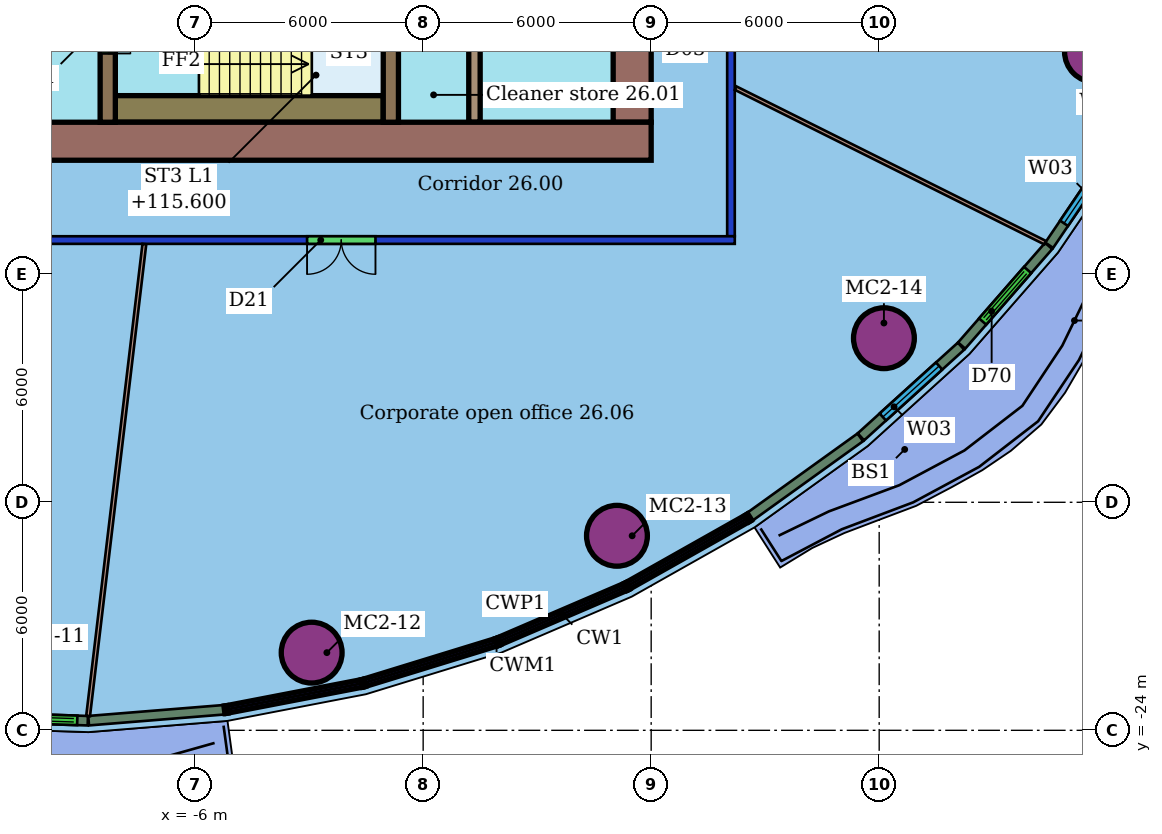
"""IFC4 building model, lengths in metres.
Left out: names, types, materials, properties, quantities, classifications, styles, units other than length and angle.
Written with IfcOpenShell. Run it as: python <this file> out.ifc"""

import sys

from ifc_helpers import new_model, si_unit, direction, frame, frame_2d, origin, origin_2d, place, context, subcontext, project, spatial, rectangle, hollow_circle, extrude, element, fill, save


model = new_model("IFC4")
c1 = context("Model", 3, precision=1e-05, world=origin(), true_north=direction((0.0, 1.0)))
c2 = subcontext(c1, "Body", "Model", "MODEL_VIEW")
j1 = project(units=[si_unit("LENGTHUNIT", "METRE"), si_unit("PLANEANGLEUNIT", "RADIAN")], contexts=[c1])
p1 = place(None, origin())
s1 = spatial("IfcSite", under=j1, at=p1, CompositionType="ELEMENT")
p2 = place(p1, origin())
s2 = spatial("IfcBuilding", under=s1, at=p2, CompositionType="ELEMENT")
p3 = place(p2, frame((0.0, 0.0, 113.8)))
s3 = spatial("IfcBuildingStorey", under=s2, at=p3, CompositionType="ELEMENT", Elevation=113.8)
for number, where, z_axis, x_axis in (
    (1, (-2.934, -21.956, 0.0), (0.0, 0.0, 1.0), (1.0, 0.0, 0.0)),
    (2, (5.1, -18.881, 0.0), (0.0, 0.0, 1.0), (1.0, 0.0, 0.0)),
    (3, (12.125, -13.683, 0.0), (0.0, 0.0, 1.0), (1.0, 0.0, 0.0)),
    (4, (17.679, -6.146, 0.0), (0.0, 0.0, 1.0), (1.0, 0.0, 0.0)),
):
    element("IfcColumn", number, at=place(p3, frame(where, z_axis=z_axis, x_axis=x_axis)), inside=s3, PredefinedType="COLUMN", context=c2, shape_type="SweptSolid", body=[
        extrude(hollow_circle(Radius=0.8, WallThickness=0.055, at=origin_2d()), origin(), (0.0, 0.0, 1.0), 3.45),
    ])
p4 = place(p3, frame((8.2, -11.1, 0.0), z_axis=(0.0, 0.0, 1.0), x_axis=(-1.0, 0.0, 0.0)))
e5 = element("IfcWall", 5, at=p4, inside=s3, PredefinedType="PARTITIONING", context=c2, shape_type="SweptSolid", body=[
    extrude(rectangle(XDim=28.4, YDim=0.2, at=frame_2d((14.2, 0.0))), origin(), (0.0, 0.0, 1.0), 3.0),
])
p5 = place(p4, frame((19.015, 0.0, 0.0)))
e6 = element("IfcOpeningElement", 6, at=p5, cuts=e5, PredefinedType="OPENING", context=c2, shape_type="SweptSolid", body=[
    extrude(rectangle(XDim=1.8, YDim=2.1, at=frame_2d((0.9, 1.05))), frame((0.0, 0.11, 0.0), z_axis=(0.0, -1.0, 0.0), x_axis=(1.0, 0.0, 0.0)), (0.0, 0.0, 1.0), 0.22),
])
p6 = place(p4, frame((9.455, 0.0, 0.0)))
e7 = element("IfcOpeningElement", 7, at=p6, cuts=e5, PredefinedType="OPENING", context=c2, shape_type="SweptSolid", body=[
    extrude(rectangle(XDim=1.8, YDim=2.1, at=frame_2d((0.9, 1.05))), frame((0.0, 0.11, 0.0), z_axis=(0.0, -1.0, 0.0), x_axis=(1.0, 0.0, 0.0)), (0.0, 0.0, 1.0), 0.22),
])
p7 = place(p3, frame((8.1, 11.0, 0.0), z_axis=(0.0, 0.0, 1.0), x_axis=(0.0, -1.0, 0.0)))
e8 = element("IfcWall", 8, at=p7, inside=s3, PredefinedType="PARTITIONING", context=c2, shape_type="SweptSolid", body=[
    extrude(rectangle(XDim=22.0, YDim=0.2, at=frame_2d((11.0, 0.0))), origin(), (0.0, 0.0, 1.0), 3.0),
])
p8 = place(p7, frame((10.26, 0.0, 0.0)))
e9 = element("IfcOpeningElement", 9, at=p8, cuts=e8, PredefinedType="OPENING", context=c2, shape_type="SweptSolid", body=[
    extrude(rectangle(XDim=1.8, YDim=2.1, at=frame_2d((0.9, 1.05))), frame((0.0, 0.11, 0.0), z_axis=(0.0, -1.0, 0.0), x_axis=(1.0, 0.0, 0.0)), (0.0, 0.0, 1.0), 0.22),
])
p9 = place(p7, frame((3.733, 0.0, 0.0)))
e10 = element("IfcOpeningElement", 10, at=p9, cuts=e8, PredefinedType="OPENING", context=c2, shape_type="SweptSolid", body=[
    extrude(rectangle(XDim=1.8, YDim=2.1, at=frame_2d((0.9, 1.05))), frame((0.0, 0.11, 0.0), z_axis=(0.0, -1.0, 0.0), x_axis=(1.0, 0.0, 0.0)), (0.0, 0.0, 1.0), 0.22),
])
p10 = place(p3, frame((-8.817, -23.622, 0.0), z_axis=(0.0, 0.0, 1.0), x_axis=(0.118395318252, 0.992966539525, 0.0)))
e11 = element("IfcWall", 11, at=p10, inside=s3, PredefinedType="PARTITIONING", context=c2, shape_type="SweptSolid", body=[
    extrude(rectangle(XDim=12.504, YDim=0.1, at=frame_2d((6.252, 0.0))), origin(), (0.0, 0.0, 1.0), 3.45),
])
p11 = place(p3, frame((16.368, -11.17, 0.0), z_axis=(0.0, 0.0, 1.0), x_axis=(-0.894652322712, 0.446763048457, 0.0)))
e12 = element("IfcWall", 12, at=p11, inside=s3, PredefinedType="PARTITIONING", context=c2, shape_type="SweptSolid", body=[
    extrude(rectangle(XDim=9.105, YDim=0.1, at=frame_2d((4.552, 0.0))), origin(), (0.0, 0.0, 1.0), 3.45),
])
p12 = place(p3, frame((-12.377, -23.633, 0.0), z_axis=(0.0, 0.0, 1.0), x_axis=(0.99948104208, -0.032212521216, 0.0)))
e13 = element("IfcWall", 13, at=p12, inside=s3, PredefinedType="SOLIDWALL", context=c2, shape_type="SweptSolid", body=[
    extrude(rectangle(XDim=3.555, YDim=0.25, at=frame_2d((1.777, 0.0))), origin(), (0.0, 0.0, 1.0), 3.05),
])
p13 = place(p12, frame((1.477, 0.0, 0.0)))
e14 = element("IfcOpeningElement", 14, at=p13, cuts=e13, PredefinedType="OPENING", context=c2, shape_type="SweptSolid", body=[
    extrude(rectangle(XDim=1.8, YDim=2.4, at=frame_2d((0.9, 1.2))), frame((0.0, 0.135, 0.0), z_axis=(0.0, -1.0, 0.0), x_axis=(1.0, 0.0, 0.0)), (0.0, 0.0, 1.0), 0.27),
])
p14 = place(p3, frame((-8.802, -23.747, 0.0), z_axis=(0.0, 0.0, 1.0), x_axis=(0.996755199543, 0.080492684039, 0.0)))
e15 = element("IfcWall", 15, at=p14, inside=s3, PredefinedType="SOLIDWALL", context=c2, shape_type="SweptSolid", body=[
    extrude(rectangle(XDim=3.57, YDim=0.25, at=frame_2d((1.785, 0.0))), origin(), (0.0, 0.0, 1.0), 3.05),
])
p15 = place(p3, frame((8.603, -18.375, 0.0), z_axis=(0.0, 0.0, 1.0), x_axis=(0.812029550547, 0.583616320058, 0.0)))
e16 = element("IfcWall", 16, at=p15, inside=s3, PredefinedType="SOLIDWALL", context=c2, shape_type="SweptSolid", body=[
    extrude(rectangle(XDim=3.57, YDim=0.25, at=frame_2d((1.785, 0.0))), origin(), (0.0, 0.0, 1.0), 3.05),
])
p16 = place(p3, frame((11.519, -16.278, 0.0), z_axis=(0.0, 0.0, 1.0), x_axis=(0.7412037287, 0.67128014462, 0.0)))
e17 = element("IfcWall", 17, at=p16, inside=s3, PredefinedType="SOLIDWALL", context=c2, shape_type="SweptSolid", body=[
    extrude(rectangle(XDim=3.554, YDim=0.25, at=frame_2d((1.777, 0.0))), origin(), (0.0, 0.0, 1.0), 3.05),
])
p17 = place(p16, frame((0.777, 0.0, 0.9)))
e18 = element("IfcOpeningElement", 18, at=p17, cuts=e17, PredefinedType="OPENING", context=c2, shape_type="SweptSolid", body=[
    extrude(rectangle(XDim=2.0, YDim=2.1, at=frame_2d((1.0, 1.05))), frame((0.0, 0.135, 0.0), z_axis=(0.0, -1.0, 0.0), x_axis=(1.0, 0.0, 0.0)), (0.0, 0.0, 1.0), 0.27),
])
p18 = place(p3, frame((14.17, -13.876, 0.0), z_axis=(0.0, 0.0, 1.0), x_axis=(0.657903433386, 0.753102298721, 0.0)))
e19 = element("IfcWall", 19, at=p18, inside=s3, PredefinedType="SOLIDWALL", context=c2, shape_type="SweptSolid", body=[
    extrude(rectangle(XDim=3.48, YDim=0.25, at=frame_2d((1.74, 0.0))), origin(), (0.0, 0.0, 1.0), 3.05),
])
p19 = place(p18, frame((0.84, 0.0, 0.0)))
e20 = element("IfcOpeningElement", 20, at=p19, cuts=e19, PredefinedType="OPENING", context=c2, shape_type="SweptSolid", body=[
    extrude(rectangle(XDim=1.8, YDim=2.4, at=frame_2d((0.9, 1.2))), frame((0.0, 0.135, 0.0), z_axis=(0.0, -1.0, 0.0), x_axis=(1.0, 0.0, 0.0)), (0.0, 0.0, 1.0), 0.27),
])
p20 = place(p3, frame((16.473, -11.237, 0.0), z_axis=(0.0, 0.0, 1.0), x_axis=(0.561237624503, 0.827654715955, 0.0)))
e21 = element("IfcWall", 21, at=p20, inside=s3, PredefinedType="SOLIDWALL", context=c2, shape_type="SweptSolid", body=[
    extrude(rectangle(XDim=3.395, YDim=0.25, at=frame_2d((1.698, 0.0))), origin(), (0.0, 0.0, 1.0), 3.05),
])
p21 = place(p20, frame((0.698, 0.0, 0.9)))
e22 = element("IfcOpeningElement", 22, at=p21, cuts=e21, PredefinedType="OPENING", context=c2, shape_type="SweptSolid", body=[
    extrude(rectangle(XDim=2.0, YDim=2.1, at=frame_2d((1.0, 1.05))), frame((0.0, 0.135, 0.0), z_axis=(0.0, -1.0, 0.0), x_axis=(1.0, 0.0, 0.0)), (0.0, 0.0, 1.0), 0.27),
])
p22 = place(p3, frame((-18.0, -8.5, 0.0), z_axis=(0.0, 0.0, 1.0), x_axis=(1.0, 0.0, 0.0)))
e23 = element("IfcWall", 23, at=p22, inside=s3, PredefinedType="SHEAR", context=c2, shape_type="SweptSolid", body=[
    extrude(rectangle(XDim=24.0, YDim=1.0, at=frame_2d((12.0, 0.0))), origin(), (0.0, 0.0, 1.0), 3.3),
])
p23 = place(p22, frame((6.0, 0.0, 0.0)))
e24 = element("IfcOpeningElement", 24, at=p23, cuts=e23, PredefinedType="OPENING", context=c2, shape_type="SweptSolid", body=[
    extrude(rectangle(XDim=1.2, YDim=2.1, at=frame_2d((0.6, 1.05))), frame((0.0, 0.51, 0.0), z_axis=(0.0, -1.0, 0.0), x_axis=(1.0, 0.0, 0.0)), (0.0, 0.0, 1.0), 1.02),
])
p24 = place(p3, frame((5.5, -8.0, 0.0), z_axis=(0.0, 0.0, 1.0), x_axis=(0.0, 1.0, 0.0)))
e25 = element("IfcWall", 25, at=p24, inside=s3, PredefinedType="SHEAR", context=c2, shape_type="SweptSolid", body=[
    extrude(rectangle(XDim=16.0, YDim=1.0, at=frame_2d((8.0, 0.0))), origin(), (0.0, 0.0, 1.0), 3.3),
])
p25 = place(p24, frame((2.9, 0.0, 0.0)))
e26 = element("IfcOpeningElement", 26, at=p25, cuts=e25, PredefinedType="OPENING", context=c2, shape_type="SweptSolid", body=[
    extrude(rectangle(XDim=1.2, YDim=2.1, at=frame_2d((0.6, 1.05))), frame((0.0, 0.51, 0.0), z_axis=(0.0, -1.0, 0.0), x_axis=(1.0, 0.0, 0.0)), (0.0, 0.0, 1.0), 1.02),
])
p26 = place(p24, frame((11.9, 0.0, 0.0)))
e27 = element("IfcOpeningElement", 27, at=p26, cuts=e25, PredefinedType="OPENING", context=c2, shape_type="SweptSolid", body=[
    extrude(rectangle(XDim=1.2, YDim=2.1, at=frame_2d((0.6, 1.05))), frame((0.0, 0.51, 0.0), z_axis=(0.0, -1.0, 0.0), x_axis=(1.0, 0.0, 0.0)), (0.0, 0.0, 1.0), 1.02),
])
p27 = place(p3, frame((1.35, -8.0, 0.0), z_axis=(0.0, 0.0, 1.0), x_axis=(0.0, 1.0, 0.0)))
e28 = element("IfcWall", 28, at=p27, inside=s3, PredefinedType="SHEAR", context=c2, shape_type="SweptSolid", body=[
    extrude(rectangle(XDim=16.0, YDim=0.3, at=frame_2d((8.0, 0.0))), origin(), (0.0, 0.0, 1.0), 3.3),
])
p28 = place(p27, frame((1.91, 0.0, 0.0)))
e29 = element("IfcOpeningElement", 29, at=p28, cuts=e28, PredefinedType="OPENING", context=c2, shape_type="SweptSolid", body=[
    extrude(rectangle(XDim=1.0, YDim=2.1, at=frame_2d((0.5, 1.05))), frame((0.0, 0.16, 0.0), z_axis=(0.0, -1.0, 0.0), x_axis=(1.0, 0.0, 0.0)), (0.0, 0.0, 1.0), 0.32),
])
p29 = place(p27, frame((7.25, 0.0, 0.0)))
e30 = element("IfcOpeningElement", 30, at=p29, cuts=e28, PredefinedType="OPENING", context=c2, shape_type="SweptSolid", body=[
    extrude(rectangle(XDim=1.5, YDim=2.1, at=frame_2d((0.75, 1.05))), frame((0.0, 0.16, 0.0), z_axis=(0.0, -1.0, 0.0), x_axis=(1.0, 0.0, 0.0)), (0.0, 0.0, 1.0), 0.32),
])
p30 = place(p3, frame((-8.3, -3.88, 0.0), z_axis=(0.0, 0.0, 1.0), x_axis=(0.0, -1.0, 0.0)))
e31 = element("IfcWall", 31, at=p30, inside=s3, PredefinedType="SHEAR", context=c2, shape_type="SweptSolid", body=[
    extrude(rectangle(XDim=4.12, YDim=0.4, at=frame_2d((2.06, 0.0))), origin(), (0.0, 0.0, 1.0), 3.3),
])
p31 = place(p30, frame((1.11, 0.0, 0.0)))
e32 = element("IfcOpeningElement", 32, at=p31, cuts=e31, PredefinedType="OPENING", context=c2, shape_type="SweptSolid", body=[
    extrude(rectangle(XDim=1.2, YDim=2.1, at=frame_2d((0.6, 1.05))), frame((0.0, 0.21, 0.0), z_axis=(0.0, -1.0, 0.0), x_axis=(1.0, 0.0, 0.0)), (0.0, 0.0, 1.0), 0.42),
])
p32 = place(p3, frame((-0.85, -3.88, 0.0), z_axis=(0.0, 0.0, 1.0), x_axis=(0.0, -1.0, 0.0)))
e33 = element("IfcWall", 33, at=p32, inside=s3, PredefinedType="SHEAR", context=c2, shape_type="SweptSolid", body=[
    extrude(rectangle(XDim=4.12, YDim=0.4, at=frame_2d((2.06, 0.0))), origin(), (0.0, 0.0, 1.0), 3.3),
])
p33 = place(p3, frame((-8.1, -7.65, 0.0), z_axis=(0.0, 0.0, 1.0), x_axis=(1.0, 0.0, 0.0)))
e34 = element("IfcWall", 34, at=p33, inside=s3, PredefinedType="SHEAR", context=c2, shape_type="SweptSolid", body=[
    extrude(rectangle(XDim=7.05, YDim=0.7, at=frame_2d((3.525, 0.0))), origin(), (0.0, 0.0, 1.0), 3.3),
])
p34 = place(p6, origin())
e35 = element("IfcDoor", 35, at=p34, inside=s3, OperationType="DOUBLE_DOOR_SINGLE_SWING", PredefinedType="DOOR", context=c2, shape_type="SweptSolid", body=[
    extrude(rectangle(XDim=1.8, YDim=2.1, at=frame_2d((0.9, 1.05))), frame((0.0, 0.025, 0.0), z_axis=(0.0, -1.0, 0.0), x_axis=(1.0, 0.0, 0.0)), (0.0, 0.0, 1.0), 0.05),
])
fill(e7, e35)
p35 = place(p13, origin())
e36 = element("IfcDoor", 36, at=p35, inside=s3, OperationType="DOUBLE_DOOR_SLIDING", PredefinedType="DOOR", context=c2, shape_type="SweptSolid", body=[
    extrude(rectangle(XDim=1.8, YDim=2.4, at=frame_2d((0.9, 1.2))), frame((0.0, 0.025, 0.0), z_axis=(0.0, -1.0, 0.0), x_axis=(1.0, 0.0, 0.0)), (0.0, 0.0, 1.0), 0.05),
])
fill(e14, e36)
p36 = place(p17, origin())
e37 = element("IfcWindow", 37, at=p36, inside=s3, PartitioningType="SINGLE_PANEL", PredefinedType="WINDOW", context=c2, shape_type="SweptSolid", body=[
    extrude(rectangle(XDim=2.0, YDim=2.1, at=frame_2d((1.0, 1.05))), frame((0.0, 0.03, 0.0), z_axis=(0.0, -1.0, 0.0), x_axis=(1.0, 0.0, 0.0)), (0.0, 0.0, 1.0), 0.06),
])
fill(e18, e37)
p37 = place(p19, origin())
e38 = element("IfcDoor", 38, at=p37, inside=s3, OperationType="DOUBLE_DOOR_SLIDING", PredefinedType="DOOR", context=c2, shape_type="SweptSolid", body=[
    extrude(rectangle(XDim=1.8, YDim=2.4, at=frame_2d((0.9, 1.2))), frame((0.0, 0.025, 0.0), z_axis=(0.0, -1.0, 0.0), x_axis=(1.0, 0.0, 0.0)), (0.0, 0.0, 1.0), 0.05),
])
fill(e20, e38)
p38 = place(p21, origin())
e39 = element("IfcWindow", 39, at=p38, inside=s3, PartitioningType="SINGLE_PANEL", PredefinedType="WINDOW", context=c2, shape_type="SweptSolid", body=[
    extrude(rectangle(XDim=2.0, YDim=2.1, at=frame_2d((1.0, 1.05))), frame((0.0, 0.03, 0.0), z_axis=(0.0, -1.0, 0.0), x_axis=(1.0, 0.0, 0.0)), (0.0, 0.0, 1.0), 0.06),
])
fill(e22, e39)
p39 = place(p31, origin())
e40 = element("IfcDoor", 40, at=p39, inside=s3, OperationType="DOUBLE_DOOR_SINGLE_SWING", PredefinedType="NOTDEFINED", context=c2, shape_type="SweptSolid", body=[
    extrude(rectangle(XDim=1.2, YDim=2.1, at=frame_2d((0.6, 1.05))), frame((0.0, 0.025, 0.0), z_axis=(0.0, -1.0, 0.0), x_axis=(1.0, 0.0, 0.0)), (0.0, 0.0, 1.0), 0.05),
])
fill(e32, e40)
save(model, sys.argv[1])
